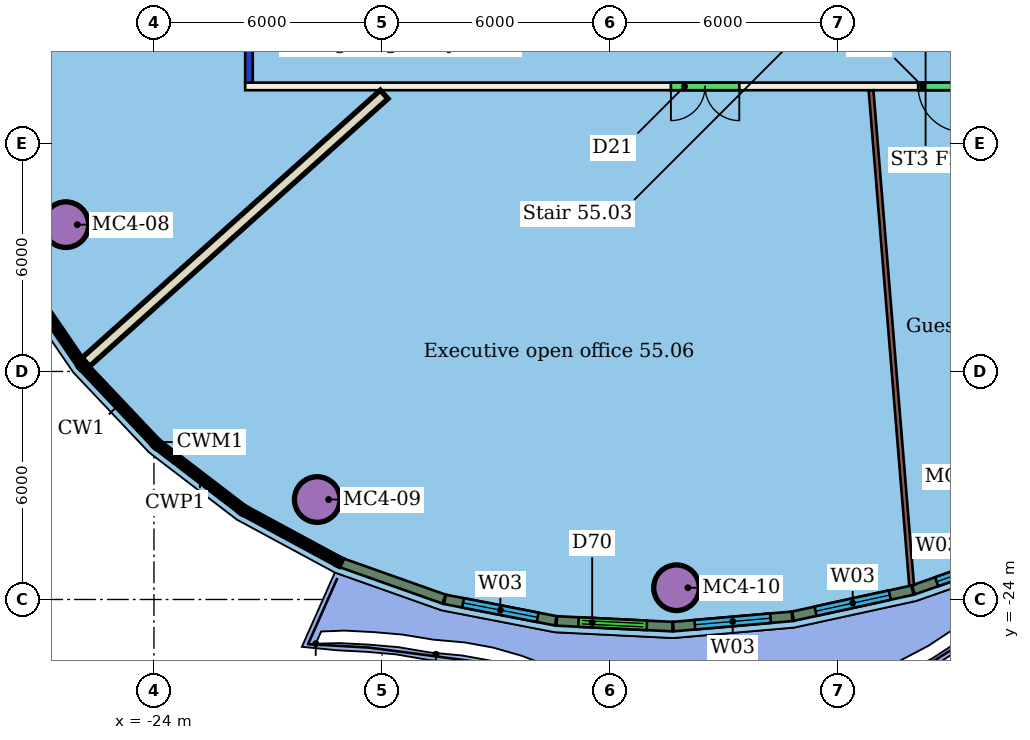
"""IFC4 building model, lengths in metres.
Left out: names, types, materials, properties, quantities, classifications, styles, units other than length and angle.
Written with IfcOpenShell. Run it as: python <this file> out.ifc"""

import sys

from ifc_helpers import new_model, si_unit, direction, frame, frame_2d, origin, origin_2d, place, context, subcontext, project, spatial, rectangle, hollow_circle, extrude, element, fill, save


model = new_model("IFC4")
c1 = context("Model", 3, precision=1e-05, world=origin(), true_north=direction((0.0, 1.0)))
c2 = subcontext(c1, "Body", "Model", "MODEL_VIEW")
j1 = project(units=[si_unit("LENGTHUNIT", "METRE"), si_unit("PLANEANGLEUNIT", "RADIAN")], contexts=[c1])
p1 = place(None, origin())
s1 = spatial("IfcSite", under=j1, at=p1, CompositionType="ELEMENT")
p2 = place(p1, origin())
s2 = spatial("IfcBuilding", under=s1, at=p2, CompositionType="ELEMENT")
p3 = place(p2, frame((0.0, 0.0, 224.5)))
s3 = spatial("IfcBuildingStorey", under=s2, at=p3, CompositionType="ELEMENT", Elevation=224.5)
for number, where, z_axis, x_axis in (
    (1, (-26.318, -14.137, 0.0), (0.0, 0.0, 1.0), (1.0, 0.0, 0.0)),
    (2, (-19.704, -21.37, 0.0), (0.0, 0.0, 1.0), (1.0, 0.0, 0.0)),
    (3, (-10.25, -23.691, 0.0), (0.0, 0.0, 1.0), (1.0, 0.0, 0.0)),
):
    element("IfcColumn", number, at=place(p3, frame(where, z_axis=z_axis, x_axis=x_axis)), inside=s3, PredefinedType="COLUMN", context=c2, shape_type="SweptSolid", body=[
        extrude(hollow_circle(Radius=0.6, WallThickness=0.045, at=origin_2d()), origin(), (0.0, 0.0, 1.0), 3.45),
    ])
p4 = place(p3, frame((9.6, -10.5, 0.0), z_axis=(0.0, 0.0, 1.0), x_axis=(-1.0, 0.0, 0.0)))
e4 = element("IfcWall", 4, at=p4, inside=s3, PredefinedType="PARTITIONING", context=c2, shape_type="SweptSolid", body=[
    extrude(rectangle(XDim=31.2, YDim=0.2, at=frame_2d((15.6, 0.0))), origin(), (0.0, 0.0, 1.0), 3.45),
])
p5 = place(p4, frame((18.197, 0.0, 0.0)))
e5 = element("IfcOpeningElement", 5, at=p5, cuts=e4, PredefinedType="OPENING", context=c2, shape_type="SweptSolid", body=[
    extrude(rectangle(XDim=1.8, YDim=2.1, at=frame_2d((0.9, 1.05))), frame((0.0, 0.11, 0.0), z_axis=(0.0, -1.0, 0.0), x_axis=(1.0, 0.0, 0.0)), (0.0, 0.0, 1.0), 0.22),
])
p6 = place(p4, frame((12.291, 0.0, 0.0)))
e6 = element("IfcOpeningElement", 6, at=p6, cuts=e4, PredefinedType="OPENING", context=c2, shape_type="SweptSolid", body=[
    extrude(rectangle(XDim=1.2, YDim=2.4, at=frame_2d((0.6, 1.2))), frame((0.0, 0.11, 0.0), z_axis=(0.0, -1.0, 0.0), x_axis=(1.0, 0.0, 0.0)), (0.0, 0.0, 1.0), 0.22),
])
p7 = place(p4, frame((9.324, 0.0, 0.0)))
e7 = element("IfcOpeningElement", 7, at=p7, cuts=e4, PredefinedType="OPENING", context=c2, shape_type="SweptSolid", body=[
    extrude(rectangle(XDim=1.0, YDim=2.4, at=frame_2d((0.5, 1.2))), frame((0.0, 0.11, 0.0), z_axis=(0.0, -1.0, 0.0), x_axis=(1.0, 0.0, 0.0)), (0.0, 0.0, 1.0), 0.22),
])
p8 = place(p4, frame((4.086, 0.0, 0.0)))
e8 = element("IfcOpeningElement", 8, at=p8, cuts=e4, PredefinedType="OPENING", context=c2, shape_type="SweptSolid", body=[
    extrude(rectangle(XDim=1.0, YDim=2.4, at=frame_2d((0.5, 1.2))), frame((0.0, 0.11, 0.0), z_axis=(0.0, -1.0, 0.0), x_axis=(1.0, 0.0, 0.0)), (0.0, 0.0, 1.0), 0.22),
])
p9 = place(p3, frame((-21.5, -10.4, 0.0), z_axis=(0.0, 0.0, 1.0), x_axis=(0.0, 1.0, 0.0)))
e9 = element("IfcWall", 9, at=p9, inside=s3, PredefinedType="PARTITIONING", context=c2, shape_type="SweptSolid", body=[
    extrude(rectangle(XDim=20.8, YDim=0.2, at=frame_2d((10.4, 0.0))), origin(), (0.0, 0.0, 1.0), 3.05),
])
p10 = place(p9, frame((14.754, 0.0, 0.0)))
e10 = element("IfcOpeningElement", 10, at=p10, cuts=e9, PredefinedType="OPENING", context=c2, shape_type="SweptSolid", body=[
    extrude(rectangle(XDim=1.0, YDim=2.4, at=frame_2d((0.5, 1.2))), frame((0.0, 0.11, 0.0), z_axis=(0.0, -1.0, 0.0), x_axis=(1.0, 0.0, 0.0)), (0.0, 0.0, 1.0), 0.22),
])
p11 = place(p9, frame((7.034, 0.0, 0.0)))
e11 = element("IfcOpeningElement", 11, at=p11, cuts=e9, PredefinedType="OPENING", context=c2, shape_type="SweptSolid", body=[
    extrude(rectangle(XDim=1.8, YDim=2.4, at=frame_2d((0.9, 1.2))), frame((0.0, 0.11, 0.0), z_axis=(0.0, -1.0, 0.0), x_axis=(1.0, 0.0, 0.0)), (0.0, 0.0, 1.0), 0.22),
])
p12 = place(p3, frame((-25.794, -17.754, 0.0), z_axis=(0.0, 0.0, 1.0), x_axis=(0.744431366547, 0.667698989441, 0.0)))
e12 = element("IfcWall", 12, at=p12, inside=s3, PredefinedType="PARTITIONING", context=c2, shape_type="SweptSolid", body=[
    extrude(rectangle(XDim=10.547, YDim=0.3, at=frame_2d((5.274, 0.0))), origin(), (0.0, 0.0, 1.0), 3.45),
])
p13 = place(p3, frame((-4.063, -23.631, 0.0), z_axis=(0.0, 0.0, 1.0), x_axis=(-0.081688068258, 0.996657945087, 0.0)))
e13 = element("IfcWall", 13, at=p13, inside=s3, PredefinedType="PARTITIONING", context=c2, shape_type="SweptSolid", body=[
    extrude(rectangle(XDim=13.07, YDim=0.125, at=frame_2d((6.535, 0.0))), origin(), (0.0, 0.0, 1.0), 3.45),
])
p14 = place(p3, frame((-19.066, -23.035, 0.0), z_axis=(0.0, 0.0, 1.0), x_axis=(0.942660771922, -0.333752406852, 0.0)))
e14 = element("IfcWall", 14, at=p14, inside=s3, PredefinedType="SOLIDWALL", context=c2, shape_type="SweptSolid", body=[
    extrude(rectangle(XDim=2.862, YDim=0.25, at=frame_2d((1.431, 0.0))), origin(), (0.0, 0.0, 1.0), 3.1),
])
p15 = place(p3, frame((-16.342, -23.997, 0.0), z_axis=(0.0, 0.0, 1.0), x_axis=(0.981754609907, -0.190152270366, 0.0)))
e15 = element("IfcWall", 15, at=p15, inside=s3, PredefinedType="SOLIDWALL", context=c2, shape_type="SweptSolid", body=[
    extrude(rectangle(XDim=2.97, YDim=0.25, at=frame_2d((1.485, 0.0))), origin(), (0.0, 0.0, 1.0), 3.1),
])
p16 = place(p15, frame((0.485, 0.0, 0.9)))
e16 = element("IfcOpeningElement", 16, at=p16, cuts=e15, PredefinedType="OPENING", context=c2, shape_type="SweptSolid", body=[
    extrude(rectangle(XDim=2.0, YDim=2.1, at=frame_2d((1.0, 1.05))), frame((0.0, 0.135, 0.0), z_axis=(0.0, -1.0, 0.0), x_axis=(1.0, 0.0, 0.0)), (0.0, 0.0, 1.0), 0.27),
])
p17 = place(p3, frame((-13.401, -24.565, 0.0), z_axis=(0.0, 0.0, 1.0), x_axis=(0.99880196675, -0.048934969263, 0.0)))
e17 = element("IfcWall", 17, at=p17, inside=s3, PredefinedType="SOLIDWALL", context=c2, shape_type="SweptSolid", body=[
    extrude(rectangle(XDim=3.048, YDim=0.25, at=frame_2d((1.524, 0.0))), origin(), (0.0, 0.0, 1.0), 3.1),
])
p18 = place(p17, frame((0.574, 0.0, 0.0)))
e18 = element("IfcOpeningElement", 18, at=p18, cuts=e17, PredefinedType="OPENING", context=c2, shape_type="SweptSolid", body=[
    extrude(rectangle(XDim=1.8, YDim=2.4, at=frame_2d((0.9, 1.2))), frame((0.0, 0.135, 0.0), z_axis=(0.0, -1.0, 0.0), x_axis=(1.0, 0.0, 0.0)), (0.0, 0.0, 1.0), 0.27),
])
p19 = place(p3, frame((-10.332, -24.713, 0.0), z_axis=(0.0, 0.0, 1.0), x_axis=(0.996280822504, 0.086165670135, 0.0)))
e19 = element("IfcWall", 19, at=p19, inside=s3, PredefinedType="SOLIDWALL", context=c2, shape_type="SweptSolid", body=[
    extrude(rectangle(XDim=3.134, YDim=0.25, at=frame_2d((1.567, 0.0))), origin(), (0.0, 0.0, 1.0), 3.1),
])
p20 = place(p19, frame((0.567, 0.0, 0.9)))
e20 = element("IfcOpeningElement", 20, at=p20, cuts=e19, PredefinedType="OPENING", context=c2, shape_type="SweptSolid", body=[
    extrude(rectangle(XDim=2.0, YDim=2.1, at=frame_2d((1.0, 1.05))), frame((0.0, 0.135, 0.0), z_axis=(0.0, -1.0, 0.0), x_axis=(1.0, 0.0, 0.0)), (0.0, 0.0, 1.0), 0.27),
])
p21 = place(p3, frame((-7.186, -24.44, 0.0), z_axis=(0.0, 0.0, 1.0), x_axis=(0.977051639929, 0.213002565507, 0.0)))
e21 = element("IfcWall", 21, at=p21, inside=s3, PredefinedType="SOLIDWALL", context=c2, shape_type="SweptSolid", body=[
    extrude(rectangle(XDim=3.22, YDim=0.25, at=frame_2d((1.61, 0.0))), origin(), (0.0, 0.0, 1.0), 3.1),
])
p22 = place(p21, frame((0.61, 0.0, 0.9)))
e22 = element("IfcOpeningElement", 22, at=p22, cuts=e21, PredefinedType="OPENING", context=c2, shape_type="SweptSolid", body=[
    extrude(rectangle(XDim=2.0, YDim=2.1, at=frame_2d((1.0, 1.05))), frame((0.0, 0.135, 0.0), z_axis=(0.0, -1.0, 0.0), x_axis=(1.0, 0.0, 0.0)), (0.0, 0.0, 1.0), 0.27),
])
p23 = place(p3, frame((-4.018, -23.748, 0.0), z_axis=(0.0, 0.0, 1.0), x_axis=(0.943819136109, 0.330462461279, 0.0)))
e23 = element("IfcWall", 23, at=p23, inside=s3, PredefinedType="SOLIDWALL", context=c2, shape_type="SweptSolid", body=[
    extrude(rectangle(XDim=3.3, YDim=0.25, at=frame_2d((1.65, 0.0))), origin(), (0.0, 0.0, 1.0), 3.1),
])
p24 = place(p23, frame((0.65, 0.0, 0.9)))
e24 = element("IfcOpeningElement", 24, at=p24, cuts=e23, PredefinedType="OPENING", context=c2, shape_type="SweptSolid", body=[
    extrude(rectangle(XDim=2.0, YDim=2.1, at=frame_2d((1.0, 1.05))), frame((0.0, 0.135, 0.0), z_axis=(0.0, -1.0, 0.0), x_axis=(1.0, 0.0, 0.0)), (0.0, 0.0, 1.0), 0.27),
])
p25 = place(p5, origin())
e25 = element("IfcDoor", 25, at=p25, inside=s3, OperationType="DOUBLE_DOOR_SINGLE_SWING", PredefinedType="DOOR", context=c2, shape_type="SweptSolid", body=[
    extrude(rectangle(XDim=1.8, YDim=2.1, at=frame_2d((0.9, 1.05))), frame((0.0, 0.025, 0.0), z_axis=(0.0, -1.0, 0.0), x_axis=(1.0, 0.0, 0.0)), (0.0, 0.0, 1.0), 0.05),
])
fill(e5, e25)
p26 = place(p6, origin())
e26 = element("IfcDoor", 26, at=p26, inside=s3, OperationType="SINGLE_SWING_LEFT", PredefinedType="DOOR", context=c2, shape_type="SweptSolid", body=[
    extrude(rectangle(XDim=1.2, YDim=2.4, at=frame_2d((0.6, 1.2))), frame((0.0, 0.025, 0.0), z_axis=(0.0, -1.0, 0.0), x_axis=(1.0, 0.0, 0.0)), (0.0, 0.0, 1.0), 0.05),
])
fill(e6, e26)
p27 = place(p16, origin())
e27 = element("IfcWindow", 27, at=p27, inside=s3, PartitioningType="SINGLE_PANEL", PredefinedType="WINDOW", context=c2, shape_type="SweptSolid", body=[
    extrude(rectangle(XDim=2.0, YDim=2.1, at=frame_2d((1.0, 1.05))), frame((0.0, 0.03, 0.0), z_axis=(0.0, -1.0, 0.0), x_axis=(1.0, 0.0, 0.0)), (0.0, 0.0, 1.0), 0.06),
])
fill(e16, e27)
p28 = place(p18, origin())
e28 = element("IfcDoor", 28, at=p28, inside=s3, OperationType="DOUBLE_DOOR_SLIDING", PredefinedType="DOOR", context=c2, shape_type="SweptSolid", body=[
    extrude(rectangle(XDim=1.8, YDim=2.4, at=frame_2d((0.9, 1.2))), frame((0.0, 0.025, 0.0), z_axis=(0.0, -1.0, 0.0), x_axis=(1.0, 0.0, 0.0)), (0.0, 0.0, 1.0), 0.05),
])
fill(e18, e28)
p29 = place(p20, origin())
e29 = element("IfcWindow", 29, at=p29, inside=s3, PartitioningType="SINGLE_PANEL", PredefinedType="WINDOW", context=c2, shape_type="SweptSolid", body=[
    extrude(rectangle(XDim=2.0, YDim=2.1, at=frame_2d((1.0, 1.05))), frame((0.0, 0.03, 0.0), z_axis=(0.0, -1.0, 0.0), x_axis=(1.0, 0.0, 0.0)), (0.0, 0.0, 1.0), 0.06),
])
fill(e20, e29)
p30 = place(p22, origin())
e30 = element("IfcWindow", 30, at=p30, inside=s3, PartitioningType="SINGLE_PANEL", PredefinedType="WINDOW", context=c2, shape_type="SweptSolid", body=[
    extrude(rectangle(XDim=2.0, YDim=2.1, at=frame_2d((1.0, 1.05))), frame((0.0, 0.03, 0.0), z_axis=(0.0, -1.0, 0.0), x_axis=(1.0, 0.0, 0.0)), (0.0, 0.0, 1.0), 0.06),
])
fill(e22, e30)
p31 = place(p24, origin())
e31 = element("IfcWindow", 31, at=p31, inside=s3, PartitioningType="SINGLE_PANEL", PredefinedType="WINDOW", context=c2, shape_type="SweptSolid", body=[
    extrude(rectangle(XDim=2.0, YDim=2.1, at=frame_2d((1.0, 1.05))), frame((0.0, 0.03, 0.0), z_axis=(0.0, -1.0, 0.0), x_axis=(1.0, 0.0, 0.0)), (0.0, 0.0, 1.0), 0.06),
])
fill(e24, e31)
save(model, sys.argv[1])
